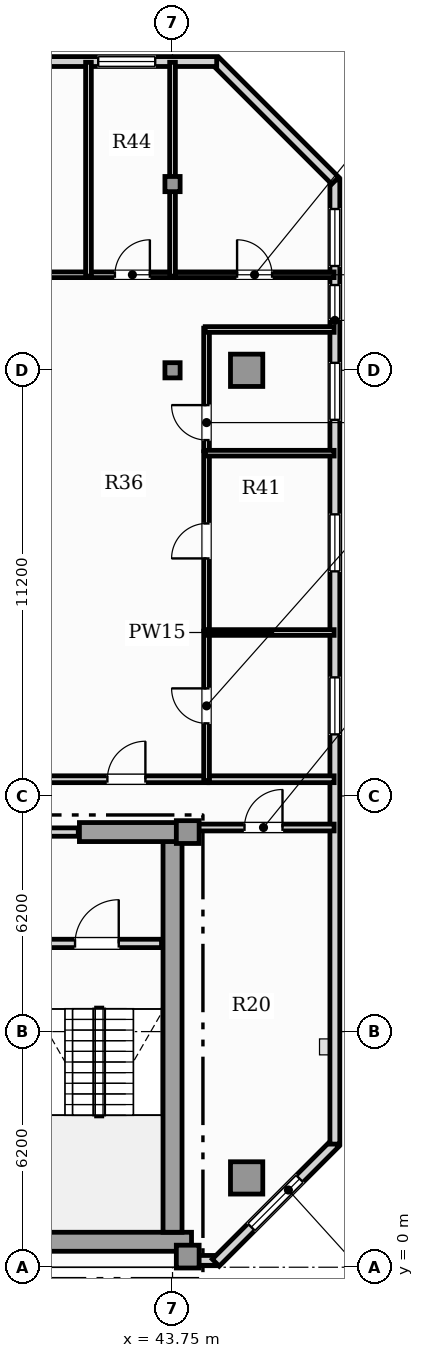
"""IFC4 building model, lengths in metres.
Left out: names, types, materials, properties, quantities, classifications, styles, units other than length and angle.
Written with IfcOpenShell. Run it as: python <this file> out.ifc"""

import sys

from ifc_helpers import new_model, si_unit, direction, frame, frame_2d, origin, origin_2d, place, context, subcontext, project, spatial, rectangle, hollow_rectangle, extrude, element, fill, save


model = new_model("IFC4")
c1 = context("Model", 3, precision=1e-05, world=origin(), true_north=direction((0.0, 1.0)))
c2 = subcontext(c1, "Body", "Model", "MODEL_VIEW")
j1 = project(units=[si_unit("LENGTHUNIT", "METRE"), si_unit("PLANEANGLEUNIT", "RADIAN")], contexts=[c1])
p1 = place(None, origin())
s1 = spatial("IfcSite", under=j1, at=p1, CompositionType="ELEMENT")
p2 = place(p1, origin())
s2 = spatial("IfcBuilding", under=s1, at=p2, CompositionType="ELEMENT")
p3 = place(p2, frame((0.0, 0.0, 337.5)))
s3 = spatial("IfcBuildingStorey", under=s2, at=p3, CompositionType="ELEMENT", Elevation=337.5)
p4 = place(p3, frame((13.25, 0.67, 0.0), z_axis=(0.0, 0.0, 1.0), x_axis=(1.0, 0.0, 0.0)))
e1 = element("IfcWall", 1, at=p4, inside=s3, PredefinedType="SHEAR", context=c2, shape_type="SweptSolid", body=[
    extrude(rectangle(XDim=31.0, YDim=0.5, at=frame_2d((15.5, 0.0))), origin(), (0.0, 0.0, 1.0), 3.63),
])
p5 = place(p3, frame((43.75, 0.92, 0.0), z_axis=(0.0, 0.0, 1.0), x_axis=(0.0, 1.0, 0.0)))
e2 = element("IfcWall", 2, at=p5, inside=s3, PredefinedType="SHEAR", context=c2, shape_type="SweptSolid", body=[
    extrude(rectangle(XDim=10.53, YDim=0.5, at=frame_2d((5.265, 0.0))), origin(), (0.0, 0.0, 1.0), 3.63),
])
p6 = place(p3, frame((41.3, 11.45, 0.0), z_axis=(0.0, 0.0, 1.0), x_axis=(1.0, 0.0, 0.0)))
e3 = element("IfcWall", 3, at=p6, inside=s3, PredefinedType="SHEAR", context=c2, shape_type="SweptSolid", body=[
    extrude(rectangle(XDim=2.95, YDim=0.5, at=frame_2d((1.475, 0.0))), origin(), (0.0, 0.0, 1.0), 3.63),
])
for number, where, z_axis, x_axis in (
    (4, (44.15, 0.28, 0.0), (0.0, 0.0, 1.0), (1.0, 0.0, 0.0)),
    (5, (44.15, 11.45, 0.0), (0.0, 0.0, 1.0), (1.0, 0.0, 0.0)),
):
    element("IfcColumn", number, at=place(p3, frame(where, z_axis=z_axis, x_axis=x_axis)), inside=s3, PredefinedType="COLUMN", context=c2, shape_type="SweptSolid", body=[
        extrude(rectangle(XDim=0.6, YDim=0.6, at=origin_2d()), origin(), (0.0, 0.0, 1.0), 3.85),
    ])
for number, where, z_axis, x_axis in (
    (6, (45.7, 2.35, 0.0), (0.0, 0.0, 1.0), (1.0, 0.0, 0.0)),
    (7, (45.7, 23.6, 0.0), (0.0, 0.0, 1.0), (1.0, 0.0, 0.0)),
):
    element("IfcColumn", number, at=place(p3, frame(where, z_axis=z_axis, x_axis=x_axis)), inside=s3, PredefinedType="USERDEFINED", context=c2, shape_type="SweptSolid", body=[
        extrude(hollow_rectangle(XDim=0.85, YDim=0.85, WallThickness=0.05, at=origin_2d()), origin(), (0.0, 0.0, 1.0), 3.85),
    ])
for number, where, z_axis, x_axis in (
    (8, (43.75, 23.6, 0.0), (0.0, 0.0, 1.0), (1.0, 0.0, 0.0)),
    (9, (43.75, 28.5, 0.0), (0.0, 0.0, 1.0), (1.0, 0.0, 0.0)),
):
    element("IfcColumn", number, at=place(p3, frame(where, z_axis=z_axis, x_axis=x_axis)), inside=s3, PredefinedType="COLUMN", context=c2, shape_type="SweptSolid", body=[
        extrude(hollow_rectangle(XDim=0.4, YDim=0.4, WallThickness=0.02, at=origin_2d()), origin(), (0.0, 0.0, 1.0), 3.85),
    ])
p7 = place(p3, frame((44.25, 0.18, 0.0), z_axis=(0.0, 0.0, 1.0), x_axis=(1.0, 0.0, 0.0)))
e10 = element("IfcWall", 10, at=p7, inside=s3, PredefinedType="SOLIDWALL", context=c2, shape_type="SweptSolid", body=[
    extrude(rectangle(XDim=0.662, YDim=0.26, at=frame_2d((0.331, 0.0))), origin(), (0.0, 0.0, 1.0), 3.63),
])
p8 = place(p3, frame((44.888, 0.12, 0.0), z_axis=(0.0, 0.0, 1.0), x_axis=(0.707106781187, 0.707106781187, 0.0)))
e11 = element("IfcWall", 11, at=p8, inside=s3, PredefinedType="SOLIDWALL", context=c2, shape_type="SweptSolid", body=[
    extrude(rectangle(XDim=4.446, YDim=0.26, at=frame_2d((2.223, 0.0))), origin(), (0.0, 0.0, 1.0), 3.63),
])
p9 = place(p8, frame((1.323, 0.0, 0.85)))
e12 = element("IfcOpeningElement", 12, at=p9, cuts=e11, PredefinedType="OPENING", context=c2, shape_type="SweptSolid", body=[
    extrude(rectangle(XDim=1.8, YDim=2.0, at=frame_2d((0.9, 1.0))), frame((0.0, 0.14, 0.0), z_axis=(0.0, -1.0, 0.0), x_axis=(1.0, 0.0, 0.0)), (0.0, 0.0, 1.0), 0.28),
])
p10 = place(p3, frame((48.021, 3.24, 0.0), z_axis=(0.0, 0.0, 1.0), x_axis=(0.0, 1.0, 0.0)))
e13 = element("IfcWall", 13, at=p10, inside=s3, PredefinedType="SOLIDWALL", context=c2, shape_type="SweptSolid", body=[
    extrude(rectangle(XDim=25.374, YDim=0.26, at=frame_2d((12.687, 0.0))), origin(), (0.0, 0.0, 1.0), 3.63),
])
p11 = place(p10, frame((21.704, 0.0, 0.95)))
e14 = element("IfcOpeningElement", 14, at=p11, cuts=e13, PredefinedType="OPENING", context=c2, shape_type="SweptSolid", body=[
    extrude(rectangle(XDim=0.9, YDim=1.5, at=frame_2d((0.45, 0.75))), frame((0.0, 0.14, 0.0), z_axis=(0.0, -1.0, 0.0), x_axis=(1.0, 0.0, 0.0)), (0.0, 0.0, 1.0), 0.28),
])
p12 = place(p10, frame((10.781, 0.0, 0.9)))
e15 = element("IfcOpeningElement", 15, at=p12, cuts=e13, PredefinedType="OPENING", context=c2, shape_type="SweptSolid", body=[
    extrude(rectangle(XDim=1.5, YDim=1.95, at=frame_2d((0.75, 0.975))), frame((0.0, 0.14, 0.0), z_axis=(0.0, -1.0, 0.0), x_axis=(1.0, 0.0, 0.0)), (0.0, 0.0, 1.0), 0.28),
])
p13 = place(p10, frame((15.07, 0.0, 0.9)))
e16 = element("IfcOpeningElement", 16, at=p13, cuts=e13, PredefinedType="OPENING", context=c2, shape_type="SweptSolid", body=[
    extrude(rectangle(XDim=1.5, YDim=1.95, at=frame_2d((0.75, 0.975))), frame((0.0, 0.14, 0.0), z_axis=(0.0, -1.0, 0.0), x_axis=(1.0, 0.0, 0.0)), (0.0, 0.0, 1.0), 0.28),
])
p14 = place(p10, frame((19.056, 0.0, 0.9)))
e17 = element("IfcOpeningElement", 17, at=p14, cuts=e13, PredefinedType="OPENING", context=c2, shape_type="SweptSolid", body=[
    extrude(rectangle(XDim=1.5, YDim=1.95, at=frame_2d((0.75, 0.975))), frame((0.0, 0.14, 0.0), z_axis=(0.0, -1.0, 0.0), x_axis=(1.0, 0.0, 0.0)), (0.0, 0.0, 1.0), 0.28),
])
p15 = place(p10, frame((23.104, 0.0, 0.9)))
e18 = element("IfcOpeningElement", 18, at=p15, cuts=e13, PredefinedType="OPENING", context=c2, shape_type="SweptSolid", body=[
    extrude(rectangle(XDim=1.5, YDim=1.95, at=frame_2d((0.75, 0.975))), frame((0.0, 0.14, 0.0), z_axis=(0.0, -1.0, 0.0), x_axis=(1.0, 0.0, 0.0)), (0.0, 0.0, 1.0), 0.28),
])
p16 = place(p3, frame((48.031, 28.59, 0.0), z_axis=(0.0, 0.0, 1.0), x_axis=(-0.707106781187, 0.707106781187, 0.0)))
e19 = element("IfcWall", 19, at=p16, inside=s3, PredefinedType="SOLIDWALL", context=c2, shape_type="SweptSolid", body=[
    extrude(rectangle(XDim=4.446, YDim=0.26, at=frame_2d((2.223, 0.0))), origin(), (0.0, 0.0, 1.0), 3.63),
])
p17 = place(p3, frame((44.912, 31.724, 0.0), z_axis=(0.0, 0.0, 1.0), x_axis=(-1.0, 0.0, 0.0)))
e20 = element("IfcWall", 20, at=p17, inside=s3, PredefinedType="SOLIDWALL", context=c2, shape_type="SweptSolid", body=[
    extrude(rectangle(XDim=10.872, YDim=0.26, at=frame_2d((5.436, 0.0))), origin(), (0.0, 0.0, 1.0), 3.63),
])
p18 = place(p17, frame((7.878, 0.0, 0.85)))
e21 = element("IfcOpeningElement", 21, at=p18, cuts=e20, PredefinedType="OPENING", context=c2, shape_type="SweptSolid", body=[
    extrude(rectangle(XDim=2.1, YDim=2.05, at=frame_2d((1.05, 1.025))), frame((0.0, 0.14, 0.0), z_axis=(0.0, -1.0, 0.0), x_axis=(1.0, 0.0, 0.0)), (0.0, 0.0, 1.0), 0.28),
])
p19 = place(p17, frame((4.502, 0.0, 0.9)))
e22 = element("IfcOpeningElement", 22, at=p19, cuts=e20, PredefinedType="OPENING", context=c2, shape_type="SweptSolid", body=[
    extrude(rectangle(XDim=1.5, YDim=1.95, at=frame_2d((0.75, 0.975))), frame((0.0, 0.14, 0.0), z_axis=(0.0, -1.0, 0.0), x_axis=(1.0, 0.0, 0.0)), (0.0, 0.0, 1.0), 0.28),
])
p20 = place(p17, frame((1.617, 0.0, 0.9)))
e23 = element("IfcOpeningElement", 23, at=p20, cuts=e20, PredefinedType="OPENING", context=c2, shape_type="SweptSolid", body=[
    extrude(rectangle(XDim=1.5, YDim=1.95, at=frame_2d((0.75, 0.975))), frame((0.0, 0.14, 0.0), z_axis=(0.0, -1.0, 0.0), x_axis=(1.0, 0.0, 0.0)), (0.0, 0.0, 1.0), 0.28),
])
p21 = place(p3, frame((40.06, 8.52, 0.0), z_axis=(0.0, 0.0, 1.0), x_axis=(1.0, 0.0, 0.0)))
e24 = element("IfcWall", 24, at=p21, inside=s3, PredefinedType="SOLIDWALL", context=c2, shape_type="SweptSolid", body=[
    extrude(rectangle(XDim=3.4, YDim=0.22, at=frame_2d((1.7, 0.0))), origin(), (0.0, 0.0, 1.0), 3.63),
])
p22 = place(p21, frame((1.125, 0.0, 0.0)))
e25 = element("IfcOpeningElement", 25, at=p22, cuts=e24, PredefinedType="OPENING", context=c2, shape_type="SweptSolid", body=[
    extrude(rectangle(XDim=1.15, YDim=2.2, at=frame_2d((0.575, 1.1))), frame((0.0, 0.12, 0.0), z_axis=(0.0, -1.0, 0.0), x_axis=(1.0, 0.0, 0.0)), (0.0, 0.0, 1.0), 0.24),
])
p23 = place(p3, frame((38.23, 11.45, 0.0), z_axis=(0.0, 0.0, 1.0), x_axis=(1.0, 0.0, 0.0)))
e26 = element("IfcWall", 26, at=p23, inside=s3, PredefinedType="SOLIDWALL", context=c2, shape_type="SweptSolid", body=[
    extrude(rectangle(XDim=3.04, YDim=0.22, at=frame_2d((1.52, 0.0))), origin(), (0.0, 0.0, 1.0), 3.63),
])
p24 = place(p23, frame((0.97, 0.0, 0.0)))
e27 = element("IfcOpeningElement", 27, at=p24, cuts=e26, PredefinedType="OPENING", context=c2, shape_type="SweptSolid", body=[
    extrude(rectangle(XDim=1.1, YDim=2.2, at=frame_2d((0.55, 1.1))), frame((0.0, 0.12, 0.0), z_axis=(0.0, -1.0, 0.0), x_axis=(1.0, 0.0, 0.0)), (0.0, 0.0, 1.0), 0.24),
])
p25 = place(p3, frame((44.285, 11.57, 0.0), z_axis=(0.0, 0.0, 1.0), x_axis=(1.0, 0.0, 0.0)))
e28 = element("IfcWall", 28, at=p25, inside=s3, PredefinedType="PARTITIONING", context=c2, shape_type="SweptSolid", body=[
    extrude(rectangle(XDim=3.717, YDim=0.18, at=frame_2d((1.859, 0.0))), origin(), (0.0, 0.0, 1.0), 3.63),
])
p26 = place(p25, frame((1.359, 0.0, 0.0)))
e29 = element("IfcOpeningElement", 29, at=p26, cuts=e28, PredefinedType="OPENING", context=c2, shape_type="SweptSolid", body=[
    extrude(rectangle(XDim=1.0, YDim=2.15, at=frame_2d((0.5, 1.075))), frame((0.0, 0.1, 0.0), z_axis=(0.0, -1.0, 0.0), x_axis=(1.0, 0.0, 0.0)), (0.0, 0.0, 1.0), 0.2),
])
p27 = place(p3, frame((40.392, 12.84, 0.0), z_axis=(0.0, 0.0, 1.0), x_axis=(1.0, 0.0, 0.0)))
e30 = element("IfcWall", 30, at=p27, inside=s3, PredefinedType="PARTITIONING", context=c2, shape_type="SweptSolid", body=[
    extrude(rectangle(XDim=4.289, YDim=0.18, at=frame_2d((2.144, 0.0))), origin(), (0.0, 0.0, 1.0), 3.63),
])
p28 = place(p27, frame((1.644, 0.0, 0.0)))
e31 = element("IfcOpeningElement", 31, at=p28, cuts=e30, PredefinedType="OPENING", context=c2, shape_type="SweptSolid", body=[
    extrude(rectangle(XDim=1.0, YDim=2.15, at=frame_2d((0.5, 1.075))), frame((0.0, 0.1, 0.0), z_axis=(0.0, -1.0, 0.0), x_axis=(1.0, 0.0, 0.0)), (0.0, 0.0, 1.0), 0.2),
])
p29 = place(p3, frame((44.71, 12.84, 0.0), z_axis=(0.0, 0.0, 1.0), x_axis=(1.0, 0.0, 0.0)))
e32 = element("IfcWall", 32, at=p29, inside=s3, PredefinedType="PARTITIONING", context=c2, shape_type="SweptSolid", body=[
    extrude(rectangle(XDim=3.292, YDim=0.18, at=frame_2d((1.646, 0.0))), origin(), (0.0, 0.0, 1.0), 3.63),
])
p30 = place(p3, frame((44.646, 12.805, 0.0), z_axis=(0.0, 0.0, 1.0), x_axis=(0.0, 1.0, 0.0)))
e33 = element("IfcWall", 33, at=p30, inside=s3, PredefinedType="PARTITIONING", context=c2, shape_type="SweptSolid", body=[
    extrude(rectangle(XDim=3.931, YDim=0.15, at=frame_2d((1.965, 0.0))), origin(), (0.0, 0.0, 1.0), 3.63),
])
p31 = place(p30, frame((1.506, 0.0, 0.0)))
e34 = element("IfcOpeningElement", 34, at=p31, cuts=e33, PredefinedType="OPENING", context=c2, shape_type="SweptSolid", body=[
    extrude(rectangle(XDim=0.92, YDim=2.1, at=frame_2d((0.46, 1.05))), frame((0.0, 0.085, 0.0), z_axis=(0.0, -1.0, 0.0), x_axis=(1.0, 0.0, 0.0)), (0.0, 0.0, 1.0), 0.17),
])
p32 = place(p3, frame((44.646, 16.766, 0.0), z_axis=(0.0, 0.0, 1.0), x_axis=(0.0, 1.0, 0.0)))
e35 = element("IfcWall", 35, at=p32, inside=s3, PredefinedType="PARTITIONING", context=c2, shape_type="SweptSolid", body=[
    extrude(rectangle(XDim=4.688, YDim=0.15, at=frame_2d((2.344, 0.0))), origin(), (0.0, 0.0, 1.0), 3.63),
])
p33 = place(p32, frame((1.884, 0.0, 0.0)))
e36 = element("IfcOpeningElement", 36, at=p33, cuts=e35, PredefinedType="OPENING", context=c2, shape_type="SweptSolid", body=[
    extrude(rectangle(XDim=0.92, YDim=2.1, at=frame_2d((0.46, 1.05))), frame((0.0, 0.085, 0.0), z_axis=(0.0, -1.0, 0.0), x_axis=(1.0, 0.0, 0.0)), (0.0, 0.0, 1.0), 0.17),
])
p34 = place(p3, frame((44.646, 21.484, 0.0), z_axis=(0.0, 0.0, 1.0), x_axis=(0.0, 1.0, 0.0)))
e37 = element("IfcWall", 37, at=p34, inside=s3, PredefinedType="PARTITIONING", context=c2, shape_type="SweptSolid", body=[
    extrude(rectangle(XDim=3.225, YDim=0.15, at=frame_2d((1.612, 0.0))), origin(), (0.0, 0.0, 1.0), 3.63),
])
p35 = place(p34, frame((0.28, 0.0, 0.0)))
e38 = element("IfcOpeningElement", 38, at=p35, cuts=e37, PredefinedType="OPENING", context=c2, shape_type="SweptSolid", body=[
    extrude(rectangle(XDim=0.92, YDim=2.1, at=frame_2d((0.46, 1.05))), frame((0.0, 0.085, 0.0), z_axis=(0.0, -1.0, 0.0), x_axis=(1.0, 0.0, 0.0)), (0.0, 0.0, 1.0), 0.17),
])
p36 = place(p3, frame((44.61, 24.674, 0.0), z_axis=(0.0, 0.0, 1.0), x_axis=(1.0, 0.0, 0.0)))
e39 = element("IfcWall", 39, at=p36, inside=s3, PredefinedType="PARTITIONING", context=c2, shape_type="SweptSolid", body=[
    extrude(rectangle(XDim=3.392, YDim=0.15, at=frame_2d((1.696, 0.0))), origin(), (0.0, 0.0, 1.0), 3.63),
])
p37 = place(p3, frame((37.745, 26.114, 0.0), z_axis=(0.0, 0.0, 1.0), x_axis=(1.0, 0.0, 0.0)))
e40 = element("IfcWall", 40, at=p37, inside=s3, PredefinedType="PARTITIONING", context=c2, shape_type="SweptSolid", body=[
    extrude(rectangle(XDim=3.828, YDim=0.15, at=frame_2d((1.914, 0.0))), origin(), (0.0, 0.0, 1.0), 3.63),
])
p38 = place(p37, frame((1.454, 0.0, 0.0)))
e41 = element("IfcOpeningElement", 41, at=p38, cuts=e40, PredefinedType="OPENING", context=c2, shape_type="SweptSolid", body=[
    extrude(rectangle(XDim=0.92, YDim=2.1, at=frame_2d((0.46, 1.05))), frame((0.0, 0.085, 0.0), z_axis=(0.0, -1.0, 0.0), x_axis=(1.0, 0.0, 0.0)), (0.0, 0.0, 1.0), 0.17),
])
p39 = place(p3, frame((41.603, 26.114, 0.0), z_axis=(0.0, 0.0, 1.0), x_axis=(1.0, 0.0, 0.0)))
e42 = element("IfcWall", 42, at=p39, inside=s3, PredefinedType="PARTITIONING", context=c2, shape_type="SweptSolid", body=[
    extrude(rectangle(XDim=2.182, YDim=0.15, at=frame_2d((1.091, 0.0))), origin(), (0.0, 0.0, 1.0), 3.63),
])
p40 = place(p39, frame((0.631, 0.0, 0.0)))
e43 = element("IfcOpeningElement", 43, at=p40, cuts=e42, PredefinedType="OPENING", context=c2, shape_type="SweptSolid", body=[
    extrude(rectangle(XDim=0.92, YDim=2.1, at=frame_2d((0.46, 1.05))), frame((0.0, 0.085, 0.0), z_axis=(0.0, -1.0, 0.0), x_axis=(1.0, 0.0, 0.0)), (0.0, 0.0, 1.0), 0.17),
])
p41 = place(p3, frame((43.815, 26.114, 0.0), z_axis=(0.0, 0.0, 1.0), x_axis=(1.0, 0.0, 0.0)))
e44 = element("IfcWall", 44, at=p41, inside=s3, PredefinedType="PARTITIONING", context=c2, shape_type="SweptSolid", body=[
    extrude(rectangle(XDim=4.187, YDim=0.15, at=frame_2d((2.094, 0.0))), origin(), (0.0, 0.0, 1.0), 3.63),
])
p42 = place(p41, frame((1.634, 0.0, 0.0)))
e45 = element("IfcOpeningElement", 45, at=p42, cuts=e44, PredefinedType="OPENING", context=c2, shape_type="SweptSolid", body=[
    extrude(rectangle(XDim=0.92, YDim=2.1, at=frame_2d((0.46, 1.05))), frame((0.0, 0.085, 0.0), z_axis=(0.0, -1.0, 0.0), x_axis=(1.0, 0.0, 0.0)), (0.0, 0.0, 1.0), 0.17),
])
for number, where, z_axis, x_axis in (
    (46, (44.61, 16.701, 0.0), (0.0, 0.0, 1.0), (1.0, 0.0, 0.0)),
    (47, (44.61, 21.419, 0.0), (0.0, 0.0, 1.0), (1.0, 0.0, 0.0)),
):
    element("IfcWall", number, at=place(p3, frame(where, z_axis=z_axis, x_axis=x_axis)), inside=s3, PredefinedType="PARTITIONING", context=c2, shape_type="SweptSolid", body=[
        extrude(rectangle(XDim=3.392, YDim=0.15, at=frame_2d((1.696, 0.0))), origin(), (0.0, 0.0, 1.0), 3.63),
    ])
p43 = place(p3, frame((41.538, 26.079, 0.0), z_axis=(0.0, 0.0, 1.0), x_axis=(0.0, 1.0, 0.0)))
e48 = element("IfcWall", 48, at=p43, inside=s3, PredefinedType="PARTITIONING", context=c2, shape_type="SweptSolid", body=[
    extrude(rectangle(XDim=5.625, YDim=0.15, at=frame_2d((2.813, 0.0))), origin(), (0.0, 0.0, 1.0), 3.63),
])
p44 = place(p3, frame((43.75, 26.079, 0.0), z_axis=(0.0, 0.0, 1.0), x_axis=(0.0, 1.0, 0.0)))
e49 = element("IfcWall", 49, at=p44, inside=s3, PredefinedType="PARTITIONING", context=c2, shape_type="SweptSolid", body=[
    extrude(rectangle(XDim=5.625, YDim=0.15, at=frame_2d((2.813, 0.0))), origin(), (0.0, 0.0, 1.0), 3.327),
])
p45 = place(p9, origin())
e50 = element("IfcWindow", 50, at=p45, inside=s3, PartitioningType="SINGLE_PANEL", PredefinedType="WINDOW", context=c2, shape_type="SweptSolid", body=[
    extrude(rectangle(XDim=1.8, YDim=2.0, at=frame_2d((0.9, 1.0))), frame((0.0, 0.03, 0.0), z_axis=(0.0, -1.0, 0.0), x_axis=(1.0, 0.0, 0.0)), (0.0, 0.0, 1.0), 0.06),
])
fill(e12, e50)
p46 = place(p11, origin())
e51 = element("IfcWindow", 51, at=p46, inside=s3, PartitioningType="SINGLE_PANEL", PredefinedType="WINDOW", context=c2, shape_type="SweptSolid", body=[
    extrude(rectangle(XDim=0.9, YDim=1.5, at=frame_2d((0.45, 0.75))), frame((0.0, 0.03, 0.0), z_axis=(0.0, -1.0, 0.0), x_axis=(1.0, 0.0, 0.0)), (0.0, 0.0, 1.0), 0.06),
])
fill(e14, e51)
p47 = place(p12, origin())
e52 = element("IfcWindow", 52, at=p47, inside=s3, PartitioningType="SINGLE_PANEL", PredefinedType="WINDOW", context=c2, shape_type="SweptSolid", body=[
    extrude(rectangle(XDim=1.5, YDim=1.95, at=frame_2d((0.75, 0.975))), frame((0.0, 0.03, 0.0), z_axis=(0.0, -1.0, 0.0), x_axis=(1.0, 0.0, 0.0)), (0.0, 0.0, 1.0), 0.06),
])
fill(e15, e52)
p48 = place(p13, origin())
e53 = element("IfcWindow", 53, at=p48, inside=s3, PartitioningType="SINGLE_PANEL", PredefinedType="WINDOW", context=c2, shape_type="SweptSolid", body=[
    extrude(rectangle(XDim=1.5, YDim=1.95, at=frame_2d((0.75, 0.975))), frame((0.0, 0.03, 0.0), z_axis=(0.0, -1.0, 0.0), x_axis=(1.0, 0.0, 0.0)), (0.0, 0.0, 1.0), 0.06),
])
fill(e16, e53)
p49 = place(p14, origin())
e54 = element("IfcWindow", 54, at=p49, inside=s3, PartitioningType="SINGLE_PANEL", PredefinedType="WINDOW", context=c2, shape_type="SweptSolid", body=[
    extrude(rectangle(XDim=1.5, YDim=1.95, at=frame_2d((0.75, 0.975))), frame((0.0, 0.03, 0.0), z_axis=(0.0, -1.0, 0.0), x_axis=(1.0, 0.0, 0.0)), (0.0, 0.0, 1.0), 0.06),
])
fill(e17, e54)
p50 = place(p20, origin())
e55 = element("IfcWindow", 55, at=p50, inside=s3, PartitioningType="SINGLE_PANEL", PredefinedType="WINDOW", context=c2, shape_type="SweptSolid", body=[
    extrude(rectangle(XDim=1.5, YDim=1.95, at=frame_2d((0.75, 0.975))), frame((0.0, 0.03, 0.0), z_axis=(0.0, -1.0, 0.0), x_axis=(1.0, 0.0, 0.0)), (0.0, 0.0, 1.0), 0.06),
])
fill(e23, e55)
p51 = place(p15, origin())
e56 = element("IfcWindow", 56, at=p51, inside=s3, PartitioningType="SINGLE_PANEL", PredefinedType="WINDOW", context=c2, shape_type="SweptSolid", body=[
    extrude(rectangle(XDim=1.5, YDim=1.95, at=frame_2d((0.75, 0.975))), frame((0.0, 0.03, 0.0), z_axis=(0.0, -1.0, 0.0), x_axis=(1.0, 0.0, 0.0)), (0.0, 0.0, 1.0), 0.06),
])
fill(e18, e56)
p52 = place(p22, origin())
e57 = element("IfcDoor", 57, at=p52, inside=s3, OperationType="SINGLE_SWING_RIGHT", PredefinedType="DOOR", context=c2, shape_type="SweptSolid", body=[
    extrude(rectangle(XDim=1.15, YDim=2.2, at=frame_2d((0.575, 1.1))), frame((0.0, 0.025, 0.0), z_axis=(0.0, -1.0, 0.0), x_axis=(1.0, 0.0, 0.0)), (0.0, 0.0, 1.0), 0.05),
])
fill(e25, e57)
p53 = place(p26, origin())
e58 = element("IfcDoor", 58, at=p53, inside=s3, OperationType="SINGLE_SWING_RIGHT", PredefinedType="DOOR", context=c2, shape_type="SweptSolid", body=[
    extrude(rectangle(XDim=1.0, YDim=2.15, at=frame_2d((0.5, 1.075))), frame((0.0, 0.025, 0.0), z_axis=(0.0, -1.0, 0.0), x_axis=(1.0, 0.0, 0.0)), (0.0, 0.0, 1.0), 0.05),
])
fill(e29, e58)
p54 = place(p28, origin())
e59 = element("IfcDoor", 59, at=p54, inside=s3, OperationType="SINGLE_SWING_RIGHT", PredefinedType="DOOR", context=c2, shape_type="SweptSolid", body=[
    extrude(rectangle(XDim=1.0, YDim=2.15, at=frame_2d((0.5, 1.075))), frame((0.0, 0.025, 0.0), z_axis=(0.0, -1.0, 0.0), x_axis=(1.0, 0.0, 0.0)), (0.0, 0.0, 1.0), 0.05),
])
fill(e31, e59)
p55 = place(p31, origin())
e60 = element("IfcDoor", 60, at=p55, inside=s3, OperationType="SINGLE_SWING_RIGHT", PredefinedType="DOOR", context=c2, shape_type="SweptSolid", body=[
    extrude(rectangle(XDim=0.92, YDim=2.1, at=frame_2d((0.46, 1.05))), frame((0.0, 0.025, 0.0), z_axis=(0.0, -1.0, 0.0), x_axis=(1.0, 0.0, 0.0)), (0.0, 0.0, 1.0), 0.05),
])
fill(e34, e60)
p56 = place(p33, origin())
e61 = element("IfcDoor", 61, at=p56, inside=s3, OperationType="SINGLE_SWING_LEFT", PredefinedType="DOOR", context=c2, shape_type="SweptSolid", body=[
    extrude(rectangle(XDim=0.92, YDim=2.1, at=frame_2d((0.46, 1.05))), frame((0.0, 0.025, 0.0), z_axis=(0.0, -1.0, 0.0), x_axis=(1.0, 0.0, 0.0)), (0.0, 0.0, 1.0), 0.05),
])
fill(e36, e61)
p57 = place(p35, origin())
e62 = element("IfcDoor", 62, at=p57, inside=s3, OperationType="SINGLE_SWING_RIGHT", PredefinedType="DOOR", context=c2, shape_type="SweptSolid", body=[
    extrude(rectangle(XDim=0.92, YDim=2.1, at=frame_2d((0.46, 1.05))), frame((0.0, 0.025, 0.0), z_axis=(0.0, -1.0, 0.0), x_axis=(1.0, 0.0, 0.0)), (0.0, 0.0, 1.0), 0.05),
])
fill(e38, e62)
p58 = place(p40, origin())
e63 = element("IfcDoor", 63, at=p58, inside=s3, OperationType="SINGLE_SWING_RIGHT", PredefinedType="DOOR", context=c2, shape_type="SweptSolid", body=[
    extrude(rectangle(XDim=0.92, YDim=2.1, at=frame_2d((0.46, 1.05))), frame((0.0, 0.025, 0.0), z_axis=(0.0, -1.0, 0.0), x_axis=(1.0, 0.0, 0.0)), (0.0, 0.0, 1.0), 0.05),
])
fill(e43, e63)
p59 = place(p42, origin())
e64 = element("IfcDoor", 64, at=p59, inside=s3, OperationType="SINGLE_SWING_LEFT", PredefinedType="DOOR", context=c2, shape_type="SweptSolid", body=[
    extrude(rectangle(XDim=0.92, YDim=2.1, at=frame_2d((0.46, 1.05))), frame((0.0, 0.025, 0.0), z_axis=(0.0, -1.0, 0.0), x_axis=(1.0, 0.0, 0.0)), (0.0, 0.0, 1.0), 0.05),
])
fill(e45, e64)
save(model, sys.argv[1])
